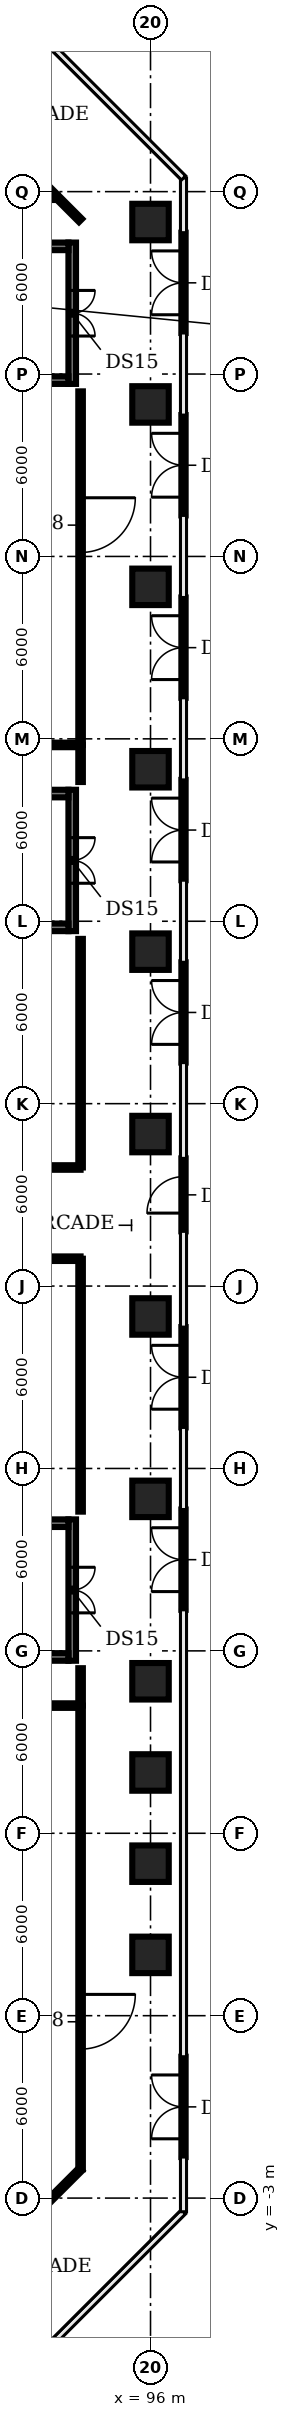
"""IFC4 building model, lengths in metres.
Left out: names, types, materials, properties, quantities, classifications, styles, units other than length and angle.
Written with IfcOpenShell. Run it as: python <this file> out.ifc"""

import sys

from ifc_helpers import new_model, si_unit, direction, frame, frame_2d, origin, origin_2d, place, context, subcontext, project, spatial, rectangle, extrude, element, fill, save


model = new_model("IFC4")
c1 = context("Model", 3, precision=1e-05, world=origin(), true_north=direction((0.0, 1.0)))
c2 = subcontext(c1, "Body", "Model", "MODEL_VIEW")
j1 = project(units=[si_unit("LENGTHUNIT", "METRE"), si_unit("PLANEANGLEUNIT", "RADIAN")], contexts=[c1])
p1 = place(None, origin())
s1 = spatial("IfcSite", under=j1, at=p1, CompositionType="ELEMENT")
p2 = place(p1, origin())
s2 = spatial("IfcBuilding", under=s1, at=p2, CompositionType="ELEMENT")
p3 = place(p2, origin())
s3 = spatial("IfcBuildingStorey", under=s2, at=p3, CompositionType="ELEMENT", Elevation=0.0)
for number, where, z_axis, x_axis in (
    (1, (96.0, 5.0, 0.0), (0.0, 0.0, 1.0), (1.0, 0.0, 0.0)),
    (2, (96.0, 8.0, 0.0), (0.0, 0.0, 1.0), (1.0, 0.0, 0.0)),
    (3, (96.0, 11.0, 0.0), (0.0, 0.0, 1.0), (1.0, 0.0, 0.0)),
    (4, (96.0, 14.0, 0.0), (0.0, 0.0, 1.0), (1.0, 0.0, 0.0)),
    (5, (96.0, 20.0, 0.0), (0.0, 0.0, 1.0), (1.0, 0.0, 0.0)),
    (6, (96.0, 26.0, 0.0), (0.0, 0.0, 1.0), (1.0, 0.0, 0.0)),
    (7, (96.0, 32.0, 0.0), (0.0, 0.0, 1.0), (1.0, 0.0, 0.0)),
    (8, (96.0, 38.0, 0.0), (0.0, 0.0, 1.0), (1.0, 0.0, 0.0)),
    (9, (96.0, 44.0, 0.0), (0.0, 0.0, 1.0), (1.0, 0.0, 0.0)),
    (10, (96.0, 50.0, 0.0), (0.0, 0.0, 1.0), (1.0, 0.0, 0.0)),
    (11, (96.0, 56.0, 0.0), (0.0, 0.0, 1.0), (1.0, 0.0, 0.0)),
    (12, (96.0, 62.0, 0.0), (0.0, 0.0, 1.0), (1.0, 0.0, 0.0)),
):
    element("IfcColumn", number, at=place(p3, frame(where, z_axis=z_axis, x_axis=x_axis)), inside=s3, PredefinedType="COLUMN", context=c2, shape_type="SweptSolid", body=[
        extrude(rectangle(XDim=1.2, YDim=1.2, at=origin_2d()), origin(), (0.0, 0.0, 1.0), 5.65),
    ])
p4 = place(p3, frame((97.085, -1.65, 0.0), z_axis=(0.0, 0.0, 1.0), x_axis=(0.0, 1.0, 0.0)))
e13 = element("IfcWall", 13, at=p4, inside=s3, PredefinedType="SOLIDWALL", context=c2, shape_type="SweptSolid", body=[
    extrude(rectangle(XDim=3.3, YDim=0.14, at=frame_2d((1.65, 0.0))), origin(), (0.0, 0.0, 1.0), 5.65),
])
p5 = place(p4, frame((0.6, 0.0, 0.0)))
e14 = element("IfcOpeningElement", 14, at=p5, cuts=e13, PredefinedType="OPENING", context=c2, shape_type="SweptSolid", body=[
    extrude(rectangle(XDim=2.1, YDim=2.4, at=frame_2d((1.05, 1.2))), frame((0.0, 0.08, 0.0), z_axis=(0.0, -1.0, 0.0), x_axis=(1.0, 0.0, 0.0)), (0.0, 0.0, 1.0), 0.16),
])
p6 = place(p3, frame((97.085, 16.35, 0.0), z_axis=(0.0, 0.0, 1.0), x_axis=(0.0, 1.0, 0.0)))
e15 = element("IfcWall", 15, at=p6, inside=s3, PredefinedType="SOLIDWALL", context=c2, shape_type="SweptSolid", body=[
    extrude(rectangle(XDim=3.3, YDim=0.14, at=frame_2d((1.65, 0.0))), origin(), (0.0, 0.0, 1.0), 5.65),
])
p7 = place(p6, frame((0.6, 0.0, 0.0)))
e16 = element("IfcOpeningElement", 16, at=p7, cuts=e15, PredefinedType="OPENING", context=c2, shape_type="SweptSolid", body=[
    extrude(rectangle(XDim=2.1, YDim=2.4, at=frame_2d((1.05, 1.2))), frame((0.0, 0.08, 0.0), z_axis=(0.0, -1.0, 0.0), x_axis=(1.0, 0.0, 0.0)), (0.0, 0.0, 1.0), 0.16),
])
p8 = place(p3, frame((97.085, 22.35, 0.0), z_axis=(0.0, 0.0, 1.0), x_axis=(0.0, 1.0, 0.0)))
e17 = element("IfcWall", 17, at=p8, inside=s3, PredefinedType="SOLIDWALL", context=c2, shape_type="SweptSolid", body=[
    extrude(rectangle(XDim=3.3, YDim=0.14, at=frame_2d((1.65, 0.0))), origin(), (0.0, 0.0, 1.0), 5.65),
])
p9 = place(p8, frame((0.6, 0.0, 0.0)))
e18 = element("IfcOpeningElement", 18, at=p9, cuts=e17, PredefinedType="OPENING", context=c2, shape_type="SweptSolid", body=[
    extrude(rectangle(XDim=2.1, YDim=2.4, at=frame_2d((1.05, 1.2))), frame((0.0, 0.08, 0.0), z_axis=(0.0, -1.0, 0.0), x_axis=(1.0, 0.0, 0.0)), (0.0, 0.0, 1.0), 0.16),
])
p10 = place(p3, frame((97.085, 28.8, 0.0), z_axis=(0.0, 0.0, 1.0), x_axis=(0.0, 1.0, 0.0)))
e19 = element("IfcWall", 19, at=p10, inside=s3, PredefinedType="SOLIDWALL", context=c2, shape_type="SweptSolid", body=[
    extrude(rectangle(XDim=2.4, YDim=0.14, at=frame_2d((1.2, 0.0))), origin(), (0.0, 0.0, 1.0), 5.65),
])
p11 = place(p10, frame((0.6, 0.0, 0.0)))
e20 = element("IfcOpeningElement", 20, at=p11, cuts=e19, PredefinedType="OPENING", context=c2, shape_type="SweptSolid", body=[
    extrude(rectangle(XDim=1.2, YDim=2.4, at=frame_2d((0.6, 1.2))), frame((0.0, 0.08, 0.0), z_axis=(0.0, -1.0, 0.0), x_axis=(1.0, 0.0, 0.0)), (0.0, 0.0, 1.0), 0.16),
])
p12 = place(p3, frame((97.085, 34.35, 0.0), z_axis=(0.0, 0.0, 1.0), x_axis=(0.0, 1.0, 0.0)))
e21 = element("IfcWall", 21, at=p12, inside=s3, PredefinedType="SOLIDWALL", context=c2, shape_type="SweptSolid", body=[
    extrude(rectangle(XDim=3.3, YDim=0.14, at=frame_2d((1.65, 0.0))), origin(), (0.0, 0.0, 1.0), 5.65),
])
p13 = place(p12, frame((0.6, 0.0, 0.0)))
e22 = element("IfcOpeningElement", 22, at=p13, cuts=e21, PredefinedType="OPENING", context=c2, shape_type="SweptSolid", body=[
    extrude(rectangle(XDim=2.1, YDim=2.4, at=frame_2d((1.05, 1.2))), frame((0.0, 0.08, 0.0), z_axis=(0.0, -1.0, 0.0), x_axis=(1.0, 0.0, 0.0)), (0.0, 0.0, 1.0), 0.16),
])
p14 = place(p3, frame((97.085, 40.35, 0.0), z_axis=(0.0, 0.0, 1.0), x_axis=(0.0, 1.0, 0.0)))
e23 = element("IfcWall", 23, at=p14, inside=s3, PredefinedType="SOLIDWALL", context=c2, shape_type="SweptSolid", body=[
    extrude(rectangle(XDim=3.3, YDim=0.14, at=frame_2d((1.65, 0.0))), origin(), (0.0, 0.0, 1.0), 5.65),
])
p15 = place(p14, frame((0.6, 0.0, 0.0)))
e24 = element("IfcOpeningElement", 24, at=p15, cuts=e23, PredefinedType="OPENING", context=c2, shape_type="SweptSolid", body=[
    extrude(rectangle(XDim=2.1, YDim=2.4, at=frame_2d((1.05, 1.2))), frame((0.0, 0.08, 0.0), z_axis=(0.0, -1.0, 0.0), x_axis=(1.0, 0.0, 0.0)), (0.0, 0.0, 1.0), 0.16),
])
p16 = place(p3, frame((97.085, 46.35, 0.0), z_axis=(0.0, 0.0, 1.0), x_axis=(0.0, 1.0, 0.0)))
e25 = element("IfcWall", 25, at=p16, inside=s3, PredefinedType="SOLIDWALL", context=c2, shape_type="SweptSolid", body=[
    extrude(rectangle(XDim=3.3, YDim=0.14, at=frame_2d((1.65, 0.0))), origin(), (0.0, 0.0, 1.0), 5.65),
])
p17 = place(p16, frame((0.6, 0.0, 0.0)))
e26 = element("IfcOpeningElement", 26, at=p17, cuts=e25, PredefinedType="OPENING", context=c2, shape_type="SweptSolid", body=[
    extrude(rectangle(XDim=2.1, YDim=2.4, at=frame_2d((1.05, 1.2))), frame((0.0, 0.08, 0.0), z_axis=(0.0, -1.0, 0.0), x_axis=(1.0, 0.0, 0.0)), (0.0, 0.0, 1.0), 0.16),
])
p18 = place(p3, frame((97.085, 52.35, 0.0), z_axis=(0.0, 0.0, 1.0), x_axis=(0.0, 1.0, 0.0)))
e27 = element("IfcWall", 27, at=p18, inside=s3, PredefinedType="SOLIDWALL", context=c2, shape_type="SweptSolid", body=[
    extrude(rectangle(XDim=3.3, YDim=0.14, at=frame_2d((1.65, 0.0))), origin(), (0.0, 0.0, 1.0), 5.65),
])
p19 = place(p18, frame((0.6, 0.0, 0.0)))
e28 = element("IfcOpeningElement", 28, at=p19, cuts=e27, PredefinedType="OPENING", context=c2, shape_type="SweptSolid", body=[
    extrude(rectangle(XDim=2.1, YDim=2.4, at=frame_2d((1.05, 1.2))), frame((0.0, 0.08, 0.0), z_axis=(0.0, -1.0, 0.0), x_axis=(1.0, 0.0, 0.0)), (0.0, 0.0, 1.0), 0.16),
])
p20 = place(p3, frame((97.085, 58.35, 0.0), z_axis=(0.0, 0.0, 1.0), x_axis=(0.0, 1.0, 0.0)))
e29 = element("IfcWall", 29, at=p20, inside=s3, PredefinedType="SOLIDWALL", context=c2, shape_type="SweptSolid", body=[
    extrude(rectangle(XDim=3.3, YDim=0.14, at=frame_2d((1.65, 0.0))), origin(), (0.0, 0.0, 1.0), 5.65),
])
p21 = place(p20, frame((0.6, 0.0, 0.0)))
e30 = element("IfcOpeningElement", 30, at=p21, cuts=e29, PredefinedType="OPENING", context=c2, shape_type="SweptSolid", body=[
    extrude(rectangle(XDim=2.1, YDim=2.4, at=frame_2d((1.05, 1.2))), frame((0.0, 0.08, 0.0), z_axis=(0.0, -1.0, 0.0), x_axis=(1.0, 0.0, 0.0)), (0.0, 0.0, 1.0), 0.16),
])
p22 = place(p3, frame((93.425, 61.325, 0.0), z_axis=(0.0, 0.0, 1.0), x_axis=(0.0, -1.0, 0.0)))
e31 = element("IfcWall", 31, at=p22, inside=s3, PredefinedType="SHEAR", context=c2, shape_type="SweptSolid", body=[
    extrude(rectangle(XDim=4.65, YDim=0.25, at=frame_2d((2.325, 0.0))), origin(), (0.0, 0.0, 1.0), 5.65),
])
p23 = place(p22, frame((1.575, 0.0, 0.0)))
e32 = element("IfcOpeningElement", 32, at=p23, cuts=e31, PredefinedType="OPENING", context=c2, shape_type="SweptSolid", body=[
    extrude(rectangle(XDim=1.5, YDim=2.1, at=frame_2d((0.75, 1.05))), frame((0.0, 0.135, 0.0), z_axis=(0.0, -1.0, 0.0), x_axis=(1.0, 0.0, 0.0)), (0.0, 0.0, 1.0), 0.27),
])
for number, where, z_axis, x_axis in (
    (33, (85.1, 56.8, 0.0), (0.0, 0.0, 1.0), (1.0, 0.0, 0.0)),
    (34, (85.1, 61.2, 0.0), (0.0, 0.0, 1.0), (1.0, 0.0, 0.0)),
):
    element("IfcWall", number, at=place(p3, frame(where, z_axis=z_axis, x_axis=x_axis)), inside=s3, PredefinedType="SHEAR", context=c2, shape_type="SweptSolid", body=[
        extrude(rectangle(XDim=8.2, YDim=0.25, at=frame_2d((4.1, 0.0))), origin(), (0.0, 0.0, 1.0), 5.65),
    ])
p24 = place(p3, frame((93.425, 19.325, 0.0), z_axis=(0.0, 0.0, 1.0), x_axis=(0.0, -1.0, 0.0)))
e35 = element("IfcWall", 35, at=p24, inside=s3, PredefinedType="SHEAR", context=c2, shape_type="SweptSolid", body=[
    extrude(rectangle(XDim=4.65, YDim=0.25, at=frame_2d((2.325, 0.0))), origin(), (0.0, 0.0, 1.0), 5.65),
])
p25 = place(p24, frame((1.575, 0.0, 0.0)))
e36 = element("IfcOpeningElement", 36, at=p25, cuts=e35, PredefinedType="OPENING", context=c2, shape_type="SweptSolid", body=[
    extrude(rectangle(XDim=1.5, YDim=2.1, at=frame_2d((0.75, 1.05))), frame((0.0, 0.135, 0.0), z_axis=(0.0, -1.0, 0.0), x_axis=(1.0, 0.0, 0.0)), (0.0, 0.0, 1.0), 0.27),
])
for number, where, z_axis, x_axis in (
    (37, (85.1, 14.8, 0.0), (0.0, 0.0, 1.0), (1.0, 0.0, 0.0)),
    (38, (85.1, 19.2, 0.0), (0.0, 0.0, 1.0), (1.0, 0.0, 0.0)),
):
    element("IfcWall", number, at=place(p3, frame(where, z_axis=z_axis, x_axis=x_axis)), inside=s3, PredefinedType="SHEAR", context=c2, shape_type="SweptSolid", body=[
        extrude(rectangle(XDim=8.2, YDim=0.25, at=frame_2d((4.1, 0.0))), origin(), (0.0, 0.0, 1.0), 5.65),
    ])
p26 = place(p3, frame((93.425, 43.325, 0.0), z_axis=(0.0, 0.0, 1.0), x_axis=(0.0, -1.0, 0.0)))
e39 = element("IfcWall", 39, at=p26, inside=s3, PredefinedType="SHEAR", context=c2, shape_type="SweptSolid", body=[
    extrude(rectangle(XDim=4.65, YDim=0.25, at=frame_2d((2.325, 0.0))), origin(), (0.0, 0.0, 1.0), 5.65),
])
p27 = place(p26, frame((1.575, 0.0, 0.0)))
e40 = element("IfcOpeningElement", 40, at=p27, cuts=e39, PredefinedType="OPENING", context=c2, shape_type="SweptSolid", body=[
    extrude(rectangle(XDim=1.5, YDim=2.1, at=frame_2d((0.75, 1.05))), frame((0.0, 0.135, 0.0), z_axis=(0.0, -1.0, 0.0), x_axis=(1.0, 0.0, 0.0)), (0.0, 0.0, 1.0), 0.27),
])
for number, where, z_axis, x_axis in (
    (41, (85.1, 38.8, 0.0), (0.0, 0.0, 1.0), (1.0, 0.0, 0.0)),
    (42, (85.1, 43.2, 0.0), (0.0, 0.0, 1.0), (1.0, 0.0, 0.0)),
):
    element("IfcWall", number, at=place(p3, frame(where, z_axis=z_axis, x_axis=x_axis)), inside=s3, PredefinedType="SHEAR", context=c2, shape_type="SweptSolid", body=[
        extrude(rectangle(XDim=8.2, YDim=0.25, at=frame_2d((4.1, 0.0))), origin(), (0.0, 0.0, 1.0), 5.65),
    ])
p28 = place(p3, frame((78.0, 13.2, 0.0), z_axis=(0.0, 0.0, 1.0), x_axis=(1.0, 0.0, 0.0)))
e43 = element("IfcWall", 43, at=p28, inside=s3, PredefinedType="PARTITIONING", context=c2, shape_type="SweptSolid", body=[
    extrude(rectangle(XDim=15.7, YDim=0.15, at=frame_2d((7.85, 0.0))), origin(), (0.0, 0.0, 1.0), 4.53),
])
p29 = place(p3, frame((78.0, 30.9, 0.0), z_axis=(0.0, 0.0, 1.0), x_axis=(1.0, 0.0, 0.0)))
e44 = element("IfcWall", 44, at=p29, inside=s3, PredefinedType="PARTITIONING", context=c2, shape_type="SweptSolid", body=[
    extrude(rectangle(XDim=15.7, YDim=0.15, at=frame_2d((7.85, 0.0))), origin(), (0.0, 0.0, 1.0), 4.53),
])
p30 = place(p29, frame((8.3, 0.0, 0.0)))
e45 = element("IfcOpeningElement", 45, at=p30, cuts=e44, PredefinedType="OPENING", context=c2, shape_type="SweptSolid", body=[
    extrude(rectangle(XDim=1.2, YDim=2.1, at=frame_2d((0.6, 1.05))), frame((0.0, 0.085, 0.0), z_axis=(0.0, -1.0, 0.0), x_axis=(1.0, 0.0, 0.0)), (0.0, 0.0, 1.0), 0.17),
])
p31 = place(p3, frame((78.0, 44.8, 0.0), z_axis=(0.0, 0.0, 1.0), x_axis=(1.0, 0.0, 0.0)))
e46 = element("IfcWall", 46, at=p31, inside=s3, PredefinedType="PARTITIONING", context=c2, shape_type="SweptSolid", body=[
    extrude(rectangle(XDim=15.7, YDim=0.15, at=frame_2d((7.85, 0.0))), origin(), (0.0, 0.0, 1.0), 4.53),
])
p32 = place(p3, frame((78.0, 62.8, 0.0), z_axis=(0.0, 0.0, 1.0), x_axis=(1.0, 0.0, 0.0)))
e47 = element("IfcWall", 47, at=p32, inside=s3, PredefinedType="PARTITIONING", context=c2, shape_type="SweptSolid", body=[
    extrude(rectangle(XDim=14.95, YDim=0.15, at=frame_2d((7.475, 0.0))), origin(), (0.0, 0.0, 1.0), 4.53),
])
p33 = place(p3, frame((89.05, 66.7, 0.0), z_axis=(0.0, 0.0, 1.0), x_axis=(0.707106781187, -0.707106781187, 0.0)))
e48 = element("IfcWall", 48, at=p33, inside=s3, PredefinedType="PARTITIONING", context=c2, shape_type="SweptSolid", body=[
    extrude(rectangle(XDim=6.576, YDim=0.15, at=frame_2d((3.288, 0.0))), origin(), (0.0, 0.0, 1.0), 4.53),
])
p34 = place(p3, frame((91.25, -4.5, 0.0), z_axis=(0.0, 0.0, 1.0), x_axis=(0.707106781187, 0.707106781187, 0.0)))
e49 = element("IfcWall", 49, at=p34, inside=s3, PredefinedType="PARTITIONING", context=c2, shape_type="SweptSolid", body=[
    extrude(rectangle(XDim=3.465, YDim=0.15, at=frame_2d((1.732, 0.0))), origin(), (0.0, 0.0, 1.0), 4.53),
])
p35 = place(p3, frame((93.7, 13.2, 0.0), z_axis=(0.0, 0.0, 1.0), x_axis=(0.0, -1.0, 0.0)))
e50 = element("IfcWall", 50, at=p35, inside=s3, PredefinedType="PARTITIONING", context=c2, shape_type="SweptSolid", body=[
    extrude(rectangle(XDim=15.25, YDim=0.15, at=frame_2d((7.625, 0.0))), origin(), (0.0, 0.0, 1.0), 4.53),
])
p36 = place(p35, frame((9.5, 0.0, 0.0)))
e51 = element("IfcOpeningElement", 51, at=p36, cuts=e50, PredefinedType="OPENING", context=c2, shape_type="SweptSolid", body=[
    extrude(rectangle(XDim=1.8, YDim=2.1, at=frame_2d((0.9, 1.05))), frame((0.0, 0.085, 0.0), z_axis=(0.0, -1.0, 0.0), x_axis=(1.0, 0.0, 0.0)), (0.0, 0.0, 1.0), 0.17),
])
p37 = place(p3, frame((93.7, 13.2, 0.0), z_axis=(0.0, 0.0, 1.0), x_axis=(0.0, 1.0, 0.0)))
e52 = element("IfcWall", 52, at=p37, inside=s3, PredefinedType="PARTITIONING", context=c2, shape_type="SweptSolid", body=[
    extrude(rectangle(XDim=1.23, YDim=0.15, at=frame_2d((0.615, 0.0))), origin(), (0.0, 0.0, 1.0), 4.53),
])
p38 = place(p3, frame((93.7, 19.58, 0.0), z_axis=(0.0, 0.0, 1.0), x_axis=(0.0, 1.0, 0.0)))
e53 = element("IfcWall", 53, at=p38, inside=s3, PredefinedType="PARTITIONING", context=c2, shape_type="SweptSolid", body=[
    extrude(rectangle(XDim=8.32, YDim=0.15, at=frame_2d((4.16, 0.0))), origin(), (0.0, 0.0, 1.0), 4.53),
])
p39 = place(p3, frame((93.7, 27.9, 0.0), z_axis=(0.0, 0.0, 1.0), x_axis=(-1.0, 0.0, 0.0)))
e54 = element("IfcWall", 54, at=p39, inside=s3, PredefinedType="PARTITIONING", context=c2, shape_type="SweptSolid", body=[
    extrude(rectangle(XDim=15.7, YDim=0.15, at=frame_2d((7.85, 0.0))), origin(), (0.0, 0.0, 1.0), 4.53),
])
p40 = place(p39, frame((6.5, 0.0, 0.0)))
e55 = element("IfcOpeningElement", 55, at=p40, cuts=e54, PredefinedType="OPENING", context=c2, shape_type="SweptSolid", body=[
    extrude(rectangle(XDim=1.2, YDim=2.1, at=frame_2d((0.6, 1.05))), frame((0.0, 0.085, 0.0), z_axis=(0.0, -1.0, 0.0), x_axis=(1.0, 0.0, 0.0)), (0.0, 0.0, 1.0), 0.17),
])
p41 = place(p3, frame((93.7, 30.9, 0.0), z_axis=(0.0, 0.0, 1.0), x_axis=(0.0, 1.0, 0.0)))
e56 = element("IfcWall", 56, at=p41, inside=s3, PredefinedType="PARTITIONING", context=c2, shape_type="SweptSolid", body=[
    extrude(rectangle(XDim=7.52, YDim=0.15, at=frame_2d((3.76, 0.0))), origin(), (0.0, 0.0, 1.0), 4.53),
])
p42 = place(p3, frame((93.7, 43.58, 0.0), z_axis=(0.0, 0.0, 1.0), x_axis=(0.0, 1.0, 0.0)))
e57 = element("IfcWall", 57, at=p42, inside=s3, PredefinedType="PARTITIONING", context=c2, shape_type="SweptSolid", body=[
    extrude(rectangle(XDim=1.22, YDim=0.15, at=frame_2d((0.61, 0.0))), origin(), (0.0, 0.0, 1.0), 4.53),
])
p43 = place(p3, frame((93.7, 56.43, 0.0), z_axis=(0.0, 0.0, 1.0), x_axis=(0.0, -1.0, 0.0)))
e58 = element("IfcWall", 58, at=p43, inside=s3, PredefinedType="PARTITIONING", context=c2, shape_type="SweptSolid", body=[
    extrude(rectangle(XDim=11.63, YDim=0.15, at=frame_2d((5.815, 0.0))), origin(), (0.0, 0.0, 1.0), 4.53),
])
p44 = place(p43, frame((3.5, 0.0, 0.0)))
e59 = element("IfcOpeningElement", 59, at=p44, cuts=e58, PredefinedType="OPENING", context=c2, shape_type="SweptSolid", body=[
    extrude(rectangle(XDim=1.8, YDim=2.1, at=frame_2d((0.9, 1.05))), frame((0.0, 0.085, 0.0), z_axis=(0.0, -1.0, 0.0), x_axis=(1.0, 0.0, 0.0)), (0.0, 0.0, 1.0), 0.17),
])
p45 = place(p5, origin())
e60 = element("IfcDoor", 60, at=p45, inside=s3, OperationType="DOUBLE_DOOR_DOUBLE_SWING", PredefinedType="DOOR", context=c2, shape_type="SweptSolid", body=[
    extrude(rectangle(XDim=2.1, YDim=2.4, at=frame_2d((1.05, 1.2))), frame((0.0, 0.025, 0.0), z_axis=(0.0, -1.0, 0.0), x_axis=(1.0, 0.0, 0.0)), (0.0, 0.0, 1.0), 0.05),
])
fill(e14, e60)
p46 = place(p7, origin())
e61 = element("IfcDoor", 61, at=p46, inside=s3, OperationType="DOUBLE_DOOR_DOUBLE_SWING", PredefinedType="DOOR", context=c2, shape_type="SweptSolid", body=[
    extrude(rectangle(XDim=2.1, YDim=2.4, at=frame_2d((1.05, 1.2))), frame((0.0, 0.025, 0.0), z_axis=(0.0, -1.0, 0.0), x_axis=(1.0, 0.0, 0.0)), (0.0, 0.0, 1.0), 0.05),
])
fill(e16, e61)
p47 = place(p9, origin())
e62 = element("IfcDoor", 62, at=p47, inside=s3, OperationType="DOUBLE_DOOR_DOUBLE_SWING", PredefinedType="DOOR", context=c2, shape_type="SweptSolid", body=[
    extrude(rectangle(XDim=2.1, YDim=2.4, at=frame_2d((1.05, 1.2))), frame((0.0, 0.025, 0.0), z_axis=(0.0, -1.0, 0.0), x_axis=(1.0, 0.0, 0.0)), (0.0, 0.0, 1.0), 0.05),
])
fill(e18, e62)
p48 = place(p11, origin())
e63 = element("IfcDoor", 63, at=p48, inside=s3, OperationType="SINGLE_SWING_LEFT", PredefinedType="DOOR", context=c2, shape_type="SweptSolid", body=[
    extrude(rectangle(XDim=1.2, YDim=2.4, at=frame_2d((0.6, 1.2))), frame((0.0, 0.025, 0.0), z_axis=(0.0, -1.0, 0.0), x_axis=(1.0, 0.0, 0.0)), (0.0, 0.0, 1.0), 0.05),
])
fill(e20, e63)
p49 = place(p13, origin())
e64 = element("IfcDoor", 64, at=p49, inside=s3, OperationType="DOUBLE_DOOR_DOUBLE_SWING", PredefinedType="DOOR", context=c2, shape_type="SweptSolid", body=[
    extrude(rectangle(XDim=2.1, YDim=2.4, at=frame_2d((1.05, 1.2))), frame((0.0, 0.025, 0.0), z_axis=(0.0, -1.0, 0.0), x_axis=(1.0, 0.0, 0.0)), (0.0, 0.0, 1.0), 0.05),
])
fill(e22, e64)
p50 = place(p15, origin())
e65 = element("IfcDoor", 65, at=p50, inside=s3, OperationType="DOUBLE_DOOR_DOUBLE_SWING", PredefinedType="DOOR", context=c2, shape_type="SweptSolid", body=[
    extrude(rectangle(XDim=2.1, YDim=2.4, at=frame_2d((1.05, 1.2))), frame((0.0, 0.025, 0.0), z_axis=(0.0, -1.0, 0.0), x_axis=(1.0, 0.0, 0.0)), (0.0, 0.0, 1.0), 0.05),
])
fill(e24, e65)
p51 = place(p17, origin())
e66 = element("IfcDoor", 66, at=p51, inside=s3, OperationType="DOUBLE_DOOR_DOUBLE_SWING", PredefinedType="DOOR", context=c2, shape_type="SweptSolid", body=[
    extrude(rectangle(XDim=2.1, YDim=2.4, at=frame_2d((1.05, 1.2))), frame((0.0, 0.025, 0.0), z_axis=(0.0, -1.0, 0.0), x_axis=(1.0, 0.0, 0.0)), (0.0, 0.0, 1.0), 0.05),
])
fill(e26, e66)
p52 = place(p19, origin())
e67 = element("IfcDoor", 67, at=p52, inside=s3, OperationType="DOUBLE_DOOR_DOUBLE_SWING", PredefinedType="DOOR", context=c2, shape_type="SweptSolid", body=[
    extrude(rectangle(XDim=2.1, YDim=2.4, at=frame_2d((1.05, 1.2))), frame((0.0, 0.025, 0.0), z_axis=(0.0, -1.0, 0.0), x_axis=(1.0, 0.0, 0.0)), (0.0, 0.0, 1.0), 0.05),
])
fill(e28, e67)
p53 = place(p21, origin())
e68 = element("IfcDoor", 68, at=p53, inside=s3, OperationType="DOUBLE_DOOR_DOUBLE_SWING", PredefinedType="DOOR", context=c2, shape_type="SweptSolid", body=[
    extrude(rectangle(XDim=2.1, YDim=2.4, at=frame_2d((1.05, 1.2))), frame((0.0, 0.025, 0.0), z_axis=(0.0, -1.0, 0.0), x_axis=(1.0, 0.0, 0.0)), (0.0, 0.0, 1.0), 0.05),
])
fill(e30, e68)
p54 = place(p23, origin())
e69 = element("IfcDoor", 69, at=p54, inside=s3, OperationType="DOUBLE_DOOR_SINGLE_SWING", PredefinedType="DOOR", context=c2, shape_type="SweptSolid", body=[
    extrude(rectangle(XDim=1.5, YDim=2.1, at=frame_2d((0.75, 1.05))), frame((0.0, 0.025, 0.0), z_axis=(0.0, -1.0, 0.0), x_axis=(1.0, 0.0, 0.0)), (0.0, 0.0, 1.0), 0.05),
])
fill(e32, e69)
p55 = place(p25, origin())
e70 = element("IfcDoor", 70, at=p55, inside=s3, OperationType="DOUBLE_DOOR_SINGLE_SWING", PredefinedType="DOOR", context=c2, shape_type="SweptSolid", body=[
    extrude(rectangle(XDim=1.5, YDim=2.1, at=frame_2d((0.75, 1.05))), frame((0.0, 0.025, 0.0), z_axis=(0.0, -1.0, 0.0), x_axis=(1.0, 0.0, 0.0)), (0.0, 0.0, 1.0), 0.05),
])
fill(e36, e70)
p56 = place(p27, origin())
e71 = element("IfcDoor", 71, at=p56, inside=s3, OperationType="DOUBLE_DOOR_SINGLE_SWING", PredefinedType="DOOR", context=c2, shape_type="SweptSolid", body=[
    extrude(rectangle(XDim=1.5, YDim=2.1, at=frame_2d((0.75, 1.05))), frame((0.0, 0.025, 0.0), z_axis=(0.0, -1.0, 0.0), x_axis=(1.0, 0.0, 0.0)), (0.0, 0.0, 1.0), 0.05),
])
fill(e40, e71)
p57 = place(p36, origin())
e72 = element("IfcDoor", 72, at=p57, inside=s3, OperationType="SINGLE_SWING_LEFT", PredefinedType="DOOR", context=c2, shape_type="SweptSolid", body=[
    extrude(rectangle(XDim=1.8, YDim=2.1, at=frame_2d((0.9, 1.05))), frame((0.0, 0.025, 0.0), z_axis=(0.0, -1.0, 0.0), x_axis=(1.0, 0.0, 0.0)), (0.0, 0.0, 1.0), 0.05),
])
fill(e51, e72)
p58 = place(p44, origin())
e73 = element("IfcDoor", 73, at=p58, inside=s3, OperationType="SINGLE_SWING_LEFT", PredefinedType="DOOR", context=c2, shape_type="SweptSolid", body=[
    extrude(rectangle(XDim=1.8, YDim=2.1, at=frame_2d((0.9, 1.05))), frame((0.0, 0.025, 0.0), z_axis=(0.0, -1.0, 0.0), x_axis=(1.0, 0.0, 0.0)), (0.0, 0.0, 1.0), 0.05),
])
fill(e59, e73)
save(model, sys.argv[1])
